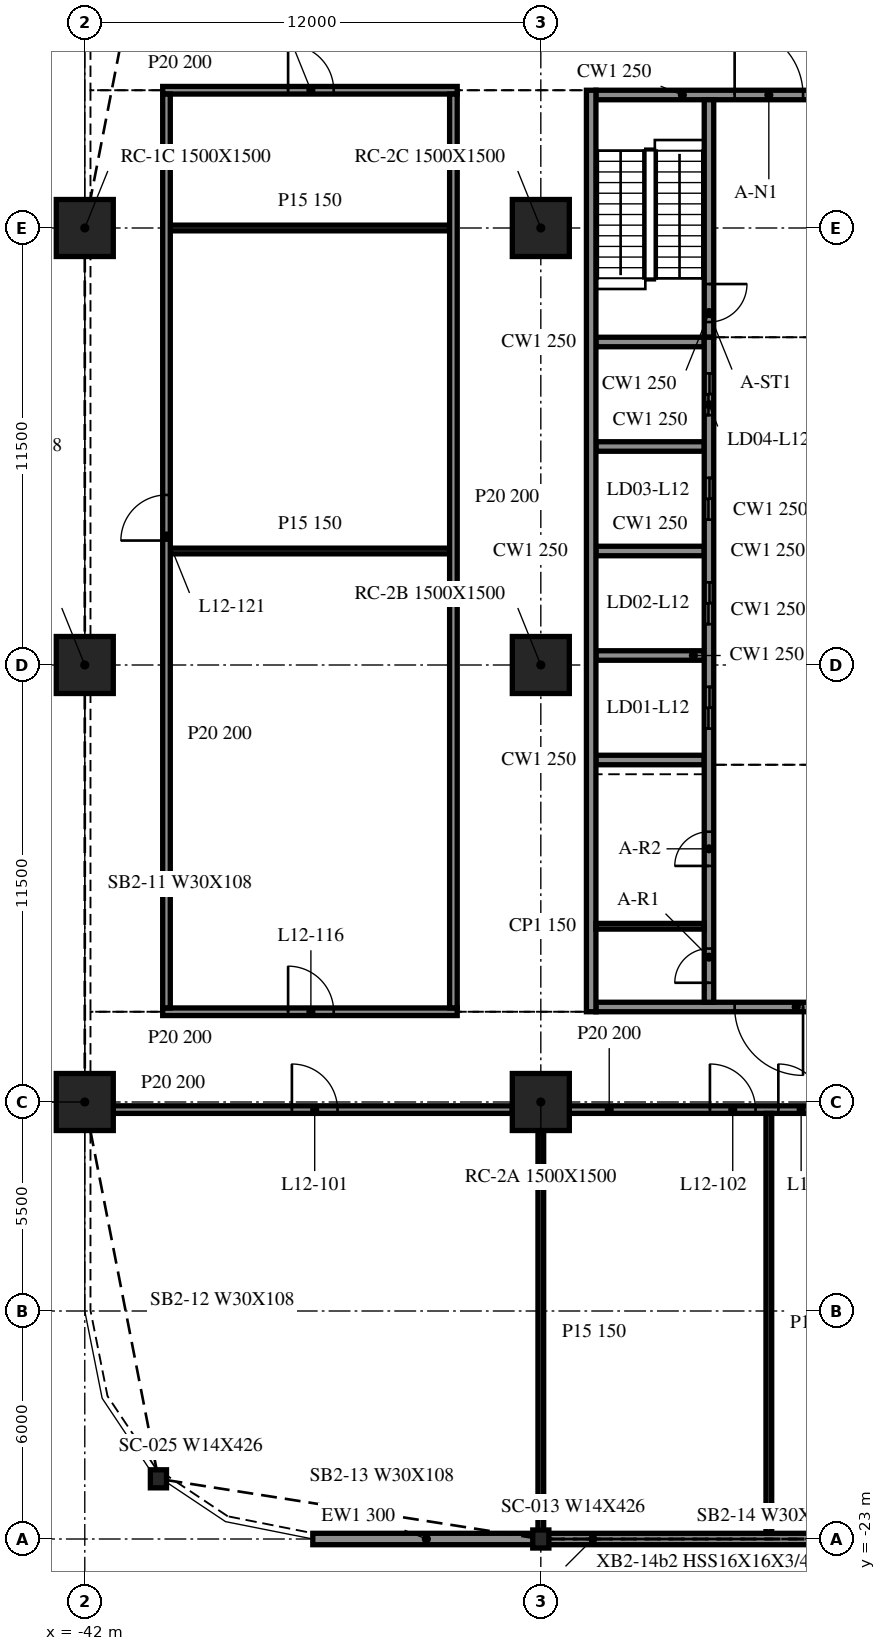
"""IFC4 building model, lengths in metres.
Left out: names, types, materials, properties, quantities, classifications, styles, units other than length and angle.
Written with IfcOpenShell. Run it as: python <this file> out.ifc"""

import sys

from ifc_helpers import new_model, si_unit, direction, frame, frame_2d, origin, origin_2d, place, context, subcontext, project, spatial, rectangle, i_section, extrude, element, fill, save


model = new_model("IFC4")
c1 = context("Model", 3, precision=1e-05, world=origin(), true_north=direction((0.0, 1.0)))
c2 = subcontext(c1, "Body", "Model", "MODEL_VIEW")
j1 = project(units=[si_unit("LENGTHUNIT", "METRE"), si_unit("PLANEANGLEUNIT", "RADIAN")], contexts=[c1])
p1 = place(None, origin())
s1 = spatial("IfcSite", under=j1, at=p1, CompositionType="ELEMENT")
p2 = place(p1, origin())
s2 = spatial("IfcBuilding", under=s1, at=p2, CompositionType="ELEMENT")
p3 = place(p2, frame((0.0, 0.0, 54.6)))
s3 = spatial("IfcBuildingStorey", under=s2, at=p3, CompositionType="ELEMENT", Elevation=54.6)
for number, where, z_axis, x_axis in (
    (1, (-42.0, -11.5, -0.34), (0.0, 0.0, 1.0), (1.0, 0.0, 0.0)),
    (2, (-42.0, 0.0, -0.34), (0.0, 0.0, 1.0), (1.0, 0.0, 0.0)),
    (3, (-42.0, 11.5, -0.34), (0.0, 0.0, 1.0), (1.0, 0.0, 0.0)),
    (4, (-30.0, -11.5, -0.34), (0.0, 0.0, 1.0), (1.0, 0.0, 0.0)),
    (5, (-30.0, 0.0, -0.34), (0.0, 0.0, 1.0), (1.0, 0.0, 0.0)),
    (6, (-30.0, 11.5, -0.34), (0.0, 0.0, 1.0), (1.0, 0.0, 0.0)),
):
    element("IfcColumn", number, at=place(p3, frame(where, z_axis=z_axis, x_axis=x_axis)), inside=s3, PredefinedType="COLUMN", context=c2, shape_type="SweptSolid", body=[
        extrude(rectangle(XDim=1.5, YDim=1.5, at=origin_2d()), origin(), (0.0, 0.0, 1.0), 4.3),
    ])
for number, where, z_axis, x_axis in (
    (7, (-40.062, -21.416, -0.34), (0.0, 0.0, 1.0), (1.0, 0.0, 0.0)),
    (8, (-30.0, -23.0, -0.34), (0.0, 0.0, 1.0), (1.0, 0.0, 0.0)),
):
    element("IfcColumn", number, at=place(p3, frame(where, z_axis=z_axis, x_axis=x_axis)), inside=s3, PredefinedType="COLUMN", context=c2, shape_type="SweptSolid", body=[
        extrude(i_section(OverallWidth=0.424, OverallDepth=0.475, WebThickness=0.048, FlangeThickness=0.077, at=origin_2d()), origin(), (0.0, 0.0, 1.0), 4.3),
    ])
p4 = place(p3, frame((-36.0, -23.0, 0.0), z_axis=(0.0, 0.0, 1.0), x_axis=(1.0, 0.0, 0.0)))
e9 = element("IfcWall", 9, at=p4, inside=s3, PredefinedType="NOTDEFINED", context=c2, shape_type="SweptSolid", body=[
    extrude(rectangle(XDim=5.976, YDim=0.3, at=frame_2d((2.988, 0.0))), origin(), (0.0, 0.0, 1.0), 3.203),
])
p5 = place(p3, frame((-29.976, -23.0, 0.0), z_axis=(0.0, 0.0, 1.0), x_axis=(1.0, 0.0, 0.0)))
e10 = element("IfcWall", 10, at=p5, inside=s3, PredefinedType="NOTDEFINED", context=c2, shape_type="SweptSolid", body=[
    extrude(rectangle(XDim=11.952, YDim=0.3, at=frame_2d((5.976, 0.0))), origin(), (0.0, 0.0, 1.0), 3.203),
])
p6 = place(p3, frame((-28.675, 15.125, 0.0), z_axis=(0.0, 0.0, 1.0), x_axis=(0.0, -1.0, 0.0)))
e11 = element("IfcWall", 11, at=p6, inside=s3, PredefinedType="SOLIDWALL", context=c2, shape_type="SweptSolid", body=[
    extrude(rectangle(XDim=24.25, YDim=0.25, at=frame_2d((12.125, 0.0))), origin(), (0.0, 0.0, 1.0), 3.96),
])
p7 = place(p3, frame((-19.45, -9.0, 0.0), z_axis=(0.0, 0.0, 1.0), x_axis=(-1.0, 0.0, 0.0)))
e12 = element("IfcWall", 12, at=p7, inside=s3, PredefinedType="SOLIDWALL", context=c2, shape_type="SweptSolid", body=[
    extrude(rectangle(XDim=9.1, YDim=0.25, at=frame_2d((4.55, 0.0))), origin(), (0.0, 0.0, 1.0), 3.96),
])
p8 = place(p7, frame((3.65, 0.0, 0.0)))
e13 = element("IfcOpeningElement", 13, at=p8, cuts=e12, PredefinedType="OPENING", context=c2, shape_type="SweptSolid", body=[
    extrude(rectangle(XDim=1.8, YDim=2.1, at=frame_2d((0.9, 1.05))), frame((0.0, 0.135, 0.0), z_axis=(0.0, -1.0, 0.0), x_axis=(1.0, 0.0, 0.0)), (0.0, 0.0, 1.0), 0.27),
])
p9 = place(p3, frame((-28.55, 15.0, 0.0), z_axis=(0.0, 0.0, 1.0), x_axis=(1.0, 0.0, 0.0)))
e14 = element("IfcWall", 14, at=p9, inside=s3, PredefinedType="SOLIDWALL", context=c2, shape_type="SweptSolid", body=[
    extrude(rectangle(XDim=9.1, YDim=0.25, at=frame_2d((4.55, 0.0))), origin(), (0.0, 0.0, 1.0), 3.96),
])
p10 = place(p9, frame((3.65, 0.0, 0.0)))
e15 = element("IfcOpeningElement", 15, at=p10, cuts=e14, PredefinedType="OPENING", context=c2, shape_type="SweptSolid", body=[
    extrude(rectangle(XDim=1.8, YDim=2.1, at=frame_2d((0.9, 1.05))), frame((0.0, 0.135, 0.0), z_axis=(0.0, -1.0, 0.0), x_axis=(1.0, 0.0, 0.0)), (0.0, 0.0, 1.0), 0.27),
])
p11 = place(p3, frame((-25.575, -8.875, 0.0), z_axis=(0.0, 0.0, 1.0), x_axis=(0.0, 1.0, 0.0)))
e16 = element("IfcWall", 16, at=p11, inside=s3, PredefinedType="SOLIDWALL", context=c2, shape_type="SweptSolid", body=[
    extrude(rectangle(XDim=17.5, YDim=0.25, at=frame_2d((8.75, 0.0))), origin(), (0.0, 0.0, 1.0), 3.96),
])
p12 = place(p11, frame((7.2, 0.0, 0.0)))
e17 = element("IfcOpeningElement", 17, at=p12, cuts=e16, PredefinedType="OPENING", context=c2, shape_type="SweptSolid", body=[
    extrude(rectangle(XDim=1.1, YDim=2.1, at=frame_2d((0.55, 1.05))), frame((0.0, 0.135, 0.0), z_axis=(0.0, -1.0, 0.0), x_axis=(1.0, 0.0, 0.0)), (0.0, 0.0, 1.0), 0.27),
])
p13 = place(p11, frame((9.95, 0.0, 0.0)))
e18 = element("IfcOpeningElement", 18, at=p13, cuts=e16, PredefinedType="OPENING", context=c2, shape_type="SweptSolid", body=[
    extrude(rectangle(XDim=1.1, YDim=2.1, at=frame_2d((0.55, 1.05))), frame((0.0, 0.135, 0.0), z_axis=(0.0, -1.0, 0.0), x_axis=(1.0, 0.0, 0.0)), (0.0, 0.0, 1.0), 0.27),
])
p14 = place(p11, frame((12.7, 0.0, 0.0)))
e19 = element("IfcOpeningElement", 19, at=p14, cuts=e16, PredefinedType="OPENING", context=c2, shape_type="SweptSolid", body=[
    extrude(rectangle(XDim=1.1, YDim=2.1, at=frame_2d((0.55, 1.05))), frame((0.0, 0.135, 0.0), z_axis=(0.0, -1.0, 0.0), x_axis=(1.0, 0.0, 0.0)), (0.0, 0.0, 1.0), 0.27),
])
p15 = place(p11, frame((15.45, 0.0, 0.0)))
e20 = element("IfcOpeningElement", 20, at=p15, cuts=e16, PredefinedType="OPENING", context=c2, shape_type="SweptSolid", body=[
    extrude(rectangle(XDim=1.1, YDim=2.1, at=frame_2d((0.55, 1.05))), frame((0.0, 0.135, 0.0), z_axis=(0.0, -1.0, 0.0), x_axis=(1.0, 0.0, 0.0)), (0.0, 0.0, 1.0), 0.27),
])
p16 = place(p11, frame((0.512, 0.0, 0.0)))
e21 = element("IfcOpeningElement", 21, at=p16, cuts=e16, PredefinedType="OPENING", context=c2, shape_type="SweptSolid", body=[
    extrude(rectangle(XDim=0.9, YDim=2.1, at=frame_2d((0.45, 1.05))), frame((0.0, 0.135, 0.0), z_axis=(0.0, -1.0, 0.0), x_axis=(1.0, 0.0, 0.0)), (0.0, 0.0, 1.0), 0.27),
])
p17 = place(p11, frame((3.587, 0.0, 0.0)))
e22 = element("IfcOpeningElement", 22, at=p17, cuts=e16, PredefinedType="OPENING", context=c2, shape_type="SweptSolid", body=[
    extrude(rectangle(XDim=0.9, YDim=2.1, at=frame_2d((0.45, 1.05))), frame((0.0, 0.135, 0.0), z_axis=(0.0, -1.0, 0.0), x_axis=(1.0, 0.0, 0.0)), (0.0, 0.0, 1.0), 0.27),
])
p18 = place(p3, frame((-25.575, 14.875, 0.0), z_axis=(0.0, 0.0, 1.0), x_axis=(0.0, -1.0, 0.0)))
e23 = element("IfcWall", 23, at=p18, inside=s3, PredefinedType="SOLIDWALL", context=c2, shape_type="SweptSolid", body=[
    extrude(rectangle(XDim=6.25, YDim=0.25, at=frame_2d((3.125, 0.0))), origin(), (0.0, 0.0, 1.0), 3.96),
])
p19 = place(p18, frame((4.85, 0.0, 0.0)))
e24 = element("IfcOpeningElement", 24, at=p19, cuts=e23, PredefinedType="OPENING", context=c2, shape_type="SweptSolid", body=[
    extrude(rectangle(XDim=1.0, YDim=2.1, at=frame_2d((0.5, 1.05))), frame((0.0, 0.135, 0.0), z_axis=(0.0, -1.0, 0.0), x_axis=(1.0, 0.0, 0.0)), (0.0, 0.0, 1.0), 0.27),
])
for number, where, z_axis, x_axis in (
    (25, (-28.55, -2.5, 0.0), (0.0, 0.0, 1.0), (1.0, 0.0, 0.0)),
    (26, (-28.55, 0.25, 0.0), (0.0, 0.0, 1.0), (1.0, 0.0, 0.0)),
    (27, (-28.55, 3.0, 0.0), (0.0, 0.0, 1.0), (1.0, 0.0, 0.0)),
    (28, (-28.55, 5.75, 0.0), (0.0, 0.0, 1.0), (1.0, 0.0, 0.0)),
    (29, (-28.55, 8.5, 0.0), (0.0, 0.0, 1.0), (1.0, 0.0, 0.0)),
):
    element("IfcWall", number, at=place(p3, frame(where, z_axis=z_axis, x_axis=x_axis)), inside=s3, PredefinedType="SOLIDWALL", context=c2, shape_type="SweptSolid", body=[
        extrude(rectangle(XDim=2.85, YDim=0.25, at=frame_2d((1.425, 0.0))), origin(), (0.0, 0.0, 1.0), 3.96),
    ])
p20 = place(p3, frame((-28.55, -6.875, 0.0), z_axis=(0.0, 0.0, 1.0), x_axis=(1.0, 0.0, 0.0)))
e30 = element("IfcWall", 30, at=p20, inside=s3, PredefinedType="PARTITIONING", context=c2, shape_type="SweptSolid", body=[
    extrude(rectangle(XDim=2.85, YDim=0.15, at=frame_2d((1.425, 0.0))), origin(), (0.0, 0.0, 1.0), 3.96),
])
p21 = place(p3, frame((-41.25, -11.7, 0.0), z_axis=(0.0, 0.0, 1.0), x_axis=(1.0, 0.0, 0.0)))
e31 = element("IfcWall", 31, at=p21, inside=s3, PredefinedType="PARTITIONING", context=c2, shape_type="SweptSolid", body=[
    extrude(rectangle(XDim=10.5, YDim=0.2, at=frame_2d((5.25, 0.0))), origin(), (0.0, 0.0, 1.0), 3.96),
])
p22 = place(p21, frame((4.7, 0.0, 0.0)))
e32 = element("IfcOpeningElement", 32, at=p22, cuts=e31, PredefinedType="OPENING", context=c2, shape_type="SweptSolid", body=[
    extrude(rectangle(XDim=1.2, YDim=2.1, at=frame_2d((0.6, 1.05))), frame((0.0, 0.11, 0.0), z_axis=(0.0, -1.0, 0.0), x_axis=(1.0, 0.0, 0.0)), (0.0, 0.0, 1.0), 0.22),
])
p23 = place(p3, frame((-29.25, -11.7, 0.0), z_axis=(0.0, 0.0, 1.0), x_axis=(1.0, 0.0, 0.0)))
e33 = element("IfcWall", 33, at=p23, inside=s3, PredefinedType="PARTITIONING", context=c2, shape_type="SweptSolid", body=[
    extrude(rectangle(XDim=10.5, YDim=0.2, at=frame_2d((5.25, 0.0))), origin(), (0.0, 0.0, 1.0), 3.96),
])
p24 = place(p23, frame((3.7, 0.0, 0.0)))
e34 = element("IfcOpeningElement", 34, at=p24, cuts=e33, PredefinedType="OPENING", context=c2, shape_type="SweptSolid", body=[
    extrude(rectangle(XDim=1.2, YDim=2.1, at=frame_2d((0.6, 1.05))), frame((0.0, 0.11, 0.0), z_axis=(0.0, -1.0, 0.0), x_axis=(1.0, 0.0, 0.0)), (0.0, 0.0, 1.0), 0.22),
])
p25 = place(p23, frame((5.5, 0.0, 0.0)))
e35 = element("IfcOpeningElement", 35, at=p25, cuts=e33, PredefinedType="OPENING", context=c2, shape_type="SweptSolid", body=[
    extrude(rectangle(XDim=1.2, YDim=2.1, at=frame_2d((0.6, 1.05))), frame((0.0, 0.11, 0.0), z_axis=(0.0, -1.0, 0.0), x_axis=(1.0, 0.0, 0.0)), (0.0, 0.0, 1.0), 0.22),
])
p26 = place(p3, frame((-39.95, -9.125, 0.0), z_axis=(0.0, 0.0, 1.0), x_axis=(1.0, 0.0, 0.0)))
e36 = element("IfcWall", 36, at=p26, inside=s3, PredefinedType="PARTITIONING", context=c2, shape_type="SweptSolid", body=[
    extrude(rectangle(XDim=7.75, YDim=0.2, at=frame_2d((3.875, 0.0))), origin(), (0.0, 0.0, 1.0), 3.96),
])
p27 = place(p26, frame((3.3, 0.0, 0.0)))
e37 = element("IfcOpeningElement", 37, at=p27, cuts=e36, PredefinedType="OPENING", context=c2, shape_type="SweptSolid", body=[
    extrude(rectangle(XDim=1.2, YDim=2.1, at=frame_2d((0.6, 1.05))), frame((0.0, 0.11, 0.0), z_axis=(0.0, -1.0, 0.0), x_axis=(1.0, 0.0, 0.0)), (0.0, 0.0, 1.0), 0.22),
])
for number, where, z_axis, x_axis in (
    (38, (-39.75, 3.0, 0.0), (0.0, 0.0, 1.0), (1.0, 0.0, 0.0)),
    (39, (-39.75, 11.5, 0.0), (0.0, 0.0, 1.0), (1.0, 0.0, 0.0)),
):
    element("IfcWall", number, at=place(p3, frame(where, z_axis=z_axis, x_axis=x_axis)), inside=s3, PredefinedType="PARTITIONING", context=c2, shape_type="SweptSolid", body=[
        extrude(rectangle(XDim=7.35, YDim=0.15, at=frame_2d((3.675, 0.0))), origin(), (0.0, 0.0, 1.0), 3.96),
    ])
p28 = place(p3, frame((-39.95, 15.125, 0.0), z_axis=(0.0, 0.0, 1.0), x_axis=(1.0, 0.0, 0.0)))
e40 = element("IfcWall", 40, at=p28, inside=s3, PredefinedType="PARTITIONING", context=c2, shape_type="SweptSolid", body=[
    extrude(rectangle(XDim=7.75, YDim=0.2, at=frame_2d((3.875, 0.0))), origin(), (0.0, 0.0, 1.0), 3.96),
])
p29 = place(p28, frame((3.3, 0.0, 0.0)))
e41 = element("IfcOpeningElement", 41, at=p29, cuts=e40, PredefinedType="OPENING", context=c2, shape_type="SweptSolid", body=[
    extrude(rectangle(XDim=1.2, YDim=2.1, at=frame_2d((0.6, 1.05))), frame((0.0, 0.11, 0.0), z_axis=(0.0, -1.0, 0.0), x_axis=(1.0, 0.0, 0.0)), (0.0, 0.0, 1.0), 0.22),
])
p30 = place(p3, frame((-39.85, -9.025, 0.0), z_axis=(0.0, 0.0, 1.0), x_axis=(0.0, 1.0, 0.0)))
e42 = element("IfcWall", 42, at=p30, inside=s3, PredefinedType="PARTITIONING", context=c2, shape_type="SweptSolid", body=[
    extrude(rectangle(XDim=24.05, YDim=0.2, at=frame_2d((12.025, 0.0))), origin(), (0.0, 0.0, 1.0), 3.96),
])
p31 = place(p30, frame((12.3, 0.0, 0.0)))
e43 = element("IfcOpeningElement", 43, at=p31, cuts=e42, PredefinedType="OPENING", context=c2, shape_type="SweptSolid", body=[
    extrude(rectangle(XDim=1.2, YDim=2.1, at=frame_2d((0.6, 1.05))), frame((0.0, 0.11, 0.0), z_axis=(0.0, -1.0, 0.0), x_axis=(1.0, 0.0, 0.0)), (0.0, 0.0, 1.0), 0.22),
])
p32 = place(p3, frame((-32.3, -9.025, 0.0), z_axis=(0.0, 0.0, 1.0), x_axis=(0.0, 1.0, 0.0)))
e44 = element("IfcWall", 44, at=p32, inside=s3, PredefinedType="PARTITIONING", context=c2, shape_type="SweptSolid", body=[
    extrude(rectangle(XDim=24.05, YDim=0.2, at=frame_2d((12.025, 0.0))), origin(), (0.0, 0.0, 1.0), 3.96),
])
p33 = place(p3, frame((-30.0, -22.85, 0.0), z_axis=(0.0, 0.0, 1.0), x_axis=(0.0, 1.0, 0.0)))
e45 = element("IfcWall", 45, at=p33, inside=s3, PredefinedType="PARTITIONING", context=c2, shape_type="SweptSolid", body=[
    extrude(rectangle(XDim=10.6, YDim=0.15, at=frame_2d((5.3, 0.0))), origin(), (0.0, 0.0, 1.0), 3.96),
])
p34 = place(p3, frame((-24.0, -22.85, 0.0), z_axis=(0.0, 0.0, 1.0), x_axis=(0.0, 1.0, 0.0)))
e46 = element("IfcWall", 46, at=p34, inside=s3, PredefinedType="PARTITIONING", context=c2, shape_type="SweptSolid", body=[
    extrude(rectangle(XDim=11.05, YDim=0.15, at=frame_2d((5.525, 0.0))), origin(), (0.0, 0.0, 1.0), 3.96),
])
p35 = place(p8, origin())
e47 = element("IfcDoor", 47, at=p35, inside=s3, OperationType="DOUBLE_DOOR_SINGLE_SWING", PredefinedType="DOOR", context=c2, shape_type="SweptSolid", body=[
    extrude(rectangle(XDim=1.8, YDim=2.1, at=frame_2d((0.9, 1.05))), frame((0.0, 0.025, 0.0), z_axis=(0.0, -1.0, 0.0), x_axis=(1.0, 0.0, 0.0)), (0.0, 0.0, 1.0), 0.05),
])
fill(e13, e47)
p36 = place(p10, origin())
e48 = element("IfcDoor", 48, at=p36, inside=s3, OperationType="DOUBLE_DOOR_SINGLE_SWING", PredefinedType="DOOR", context=c2, shape_type="SweptSolid", body=[
    extrude(rectangle(XDim=1.8, YDim=2.1, at=frame_2d((0.9, 1.05))), frame((0.0, 0.025, 0.0), z_axis=(0.0, -1.0, 0.0), x_axis=(1.0, 0.0, 0.0)), (0.0, 0.0, 1.0), 0.05),
])
fill(e15, e48)
p37 = place(p12, origin())
e49 = element("IfcDoor", 49, at=p37, inside=s3, OperationType="DOUBLE_DOOR_SLIDING", PredefinedType="DOOR", context=c2, shape_type="SweptSolid", body=[
    extrude(rectangle(XDim=1.1, YDim=2.1, at=frame_2d((0.55, 1.05))), frame((0.0, 0.025, 0.0), z_axis=(0.0, -1.0, 0.0), x_axis=(1.0, 0.0, 0.0)), (0.0, 0.0, 1.0), 0.05),
])
fill(e17, e49)
p38 = place(p13, origin())
e50 = element("IfcDoor", 50, at=p38, inside=s3, OperationType="DOUBLE_DOOR_SLIDING", PredefinedType="DOOR", context=c2, shape_type="SweptSolid", body=[
    extrude(rectangle(XDim=1.1, YDim=2.1, at=frame_2d((0.55, 1.05))), frame((0.0, 0.025, 0.0), z_axis=(0.0, -1.0, 0.0), x_axis=(1.0, 0.0, 0.0)), (0.0, 0.0, 1.0), 0.05),
])
fill(e18, e50)
p39 = place(p14, origin())
e51 = element("IfcDoor", 51, at=p39, inside=s3, OperationType="DOUBLE_DOOR_SLIDING", PredefinedType="DOOR", context=c2, shape_type="SweptSolid", body=[
    extrude(rectangle(XDim=1.1, YDim=2.1, at=frame_2d((0.55, 1.05))), frame((0.0, 0.025, 0.0), z_axis=(0.0, -1.0, 0.0), x_axis=(1.0, 0.0, 0.0)), (0.0, 0.0, 1.0), 0.05),
])
fill(e19, e51)
p40 = place(p15, origin())
e52 = element("IfcDoor", 52, at=p40, inside=s3, OperationType="DOUBLE_DOOR_SLIDING", PredefinedType="DOOR", context=c2, shape_type="SweptSolid", body=[
    extrude(rectangle(XDim=1.1, YDim=2.1, at=frame_2d((0.55, 1.05))), frame((0.0, 0.025, 0.0), z_axis=(0.0, -1.0, 0.0), x_axis=(1.0, 0.0, 0.0)), (0.0, 0.0, 1.0), 0.05),
])
fill(e20, e52)
p41 = place(p16, origin())
e53 = element("IfcDoor", 53, at=p41, inside=s3, OperationType="SINGLE_SWING_LEFT", PredefinedType="DOOR", context=c2, shape_type="SweptSolid", body=[
    extrude(rectangle(XDim=0.9, YDim=2.1, at=frame_2d((0.45, 1.05))), frame((0.0, 0.025, 0.0), z_axis=(0.0, -1.0, 0.0), x_axis=(1.0, 0.0, 0.0)), (0.0, 0.0, 1.0), 0.05),
])
fill(e21, e53)
p42 = place(p17, origin())
e54 = element("IfcDoor", 54, at=p42, inside=s3, OperationType="SINGLE_SWING_RIGHT", PredefinedType="DOOR", context=c2, shape_type="SweptSolid", body=[
    extrude(rectangle(XDim=0.9, YDim=2.1, at=frame_2d((0.45, 1.05))), frame((0.0, 0.025, 0.0), z_axis=(0.0, -1.0, 0.0), x_axis=(1.0, 0.0, 0.0)), (0.0, 0.0, 1.0), 0.05),
])
fill(e22, e54)
p43 = place(p19, origin())
e55 = element("IfcDoor", 55, at=p43, inside=s3, OperationType="SINGLE_SWING_RIGHT", PredefinedType="DOOR", context=c2, shape_type="SweptSolid", body=[
    extrude(rectangle(XDim=1.0, YDim=2.1, at=frame_2d((0.5, 1.05))), frame((0.0, 0.025, 0.0), z_axis=(0.0, -1.0, 0.0), x_axis=(1.0, 0.0, 0.0)), (0.0, 0.0, 1.0), 0.05),
])
fill(e24, e55)
p44 = place(p22, origin())
e56 = element("IfcDoor", 56, at=p44, inside=s3, OperationType="SINGLE_SWING_LEFT", PredefinedType="DOOR", context=c2, shape_type="SweptSolid", body=[
    extrude(rectangle(XDim=1.2, YDim=2.1, at=frame_2d((0.6, 1.05))), frame((0.0, 0.025, 0.0), z_axis=(0.0, -1.0, 0.0), x_axis=(1.0, 0.0, 0.0)), (0.0, 0.0, 1.0), 0.05),
])
fill(e32, e56)
p45 = place(p24, origin())
e57 = element("IfcDoor", 57, at=p45, inside=s3, OperationType="SINGLE_SWING_RIGHT", PredefinedType="DOOR", context=c2, shape_type="SweptSolid", body=[
    extrude(rectangle(XDim=1.2, YDim=2.1, at=frame_2d((0.6, 1.05))), frame((0.0, 0.025, 0.0), z_axis=(0.0, -1.0, 0.0), x_axis=(1.0, 0.0, 0.0)), (0.0, 0.0, 1.0), 0.05),
])
fill(e34, e57)
p46 = place(p25, origin())
e58 = element("IfcDoor", 58, at=p46, inside=s3, OperationType="SINGLE_SWING_LEFT", PredefinedType="DOOR", context=c2, shape_type="SweptSolid", body=[
    extrude(rectangle(XDim=1.2, YDim=2.1, at=frame_2d((0.6, 1.05))), frame((0.0, 0.025, 0.0), z_axis=(0.0, -1.0, 0.0), x_axis=(1.0, 0.0, 0.0)), (0.0, 0.0, 1.0), 0.05),
])
fill(e35, e58)
p47 = place(p27, origin())
e59 = element("IfcDoor", 59, at=p47, inside=s3, OperationType="SINGLE_SWING_RIGHT", PredefinedType="DOOR", context=c2, shape_type="SweptSolid", body=[
    extrude(rectangle(XDim=1.2, YDim=2.1, at=frame_2d((0.6, 1.05))), frame((0.0, 0.025, 0.0), z_axis=(0.0, -1.0, 0.0), x_axis=(1.0, 0.0, 0.0)), (0.0, 0.0, 1.0), 0.05),
])
fill(e37, e59)
p48 = place(p31, origin())
e60 = element("IfcDoor", 60, at=p48, inside=s3, OperationType="SINGLE_SWING_LEFT", PredefinedType="DOOR", context=c2, shape_type="SweptSolid", body=[
    extrude(rectangle(XDim=1.2, YDim=2.1, at=frame_2d((0.6, 1.05))), frame((0.0, 0.025, 0.0), z_axis=(0.0, -1.0, 0.0), x_axis=(1.0, 0.0, 0.0)), (0.0, 0.0, 1.0), 0.05),
])
fill(e43, e60)
p49 = place(p29, origin())
e61 = element("IfcDoor", 61, at=p49, inside=s3, OperationType="SINGLE_SWING_LEFT", PredefinedType="DOOR", context=c2, shape_type="SweptSolid", body=[
    extrude(rectangle(XDim=1.2, YDim=2.1, at=frame_2d((0.6, 1.05))), frame((0.0, 0.025, 0.0), z_axis=(0.0, -1.0, 0.0), x_axis=(1.0, 0.0, 0.0)), (0.0, 0.0, 1.0), 0.05),
])
fill(e41, e61)
save(model, sys.argv[1])
